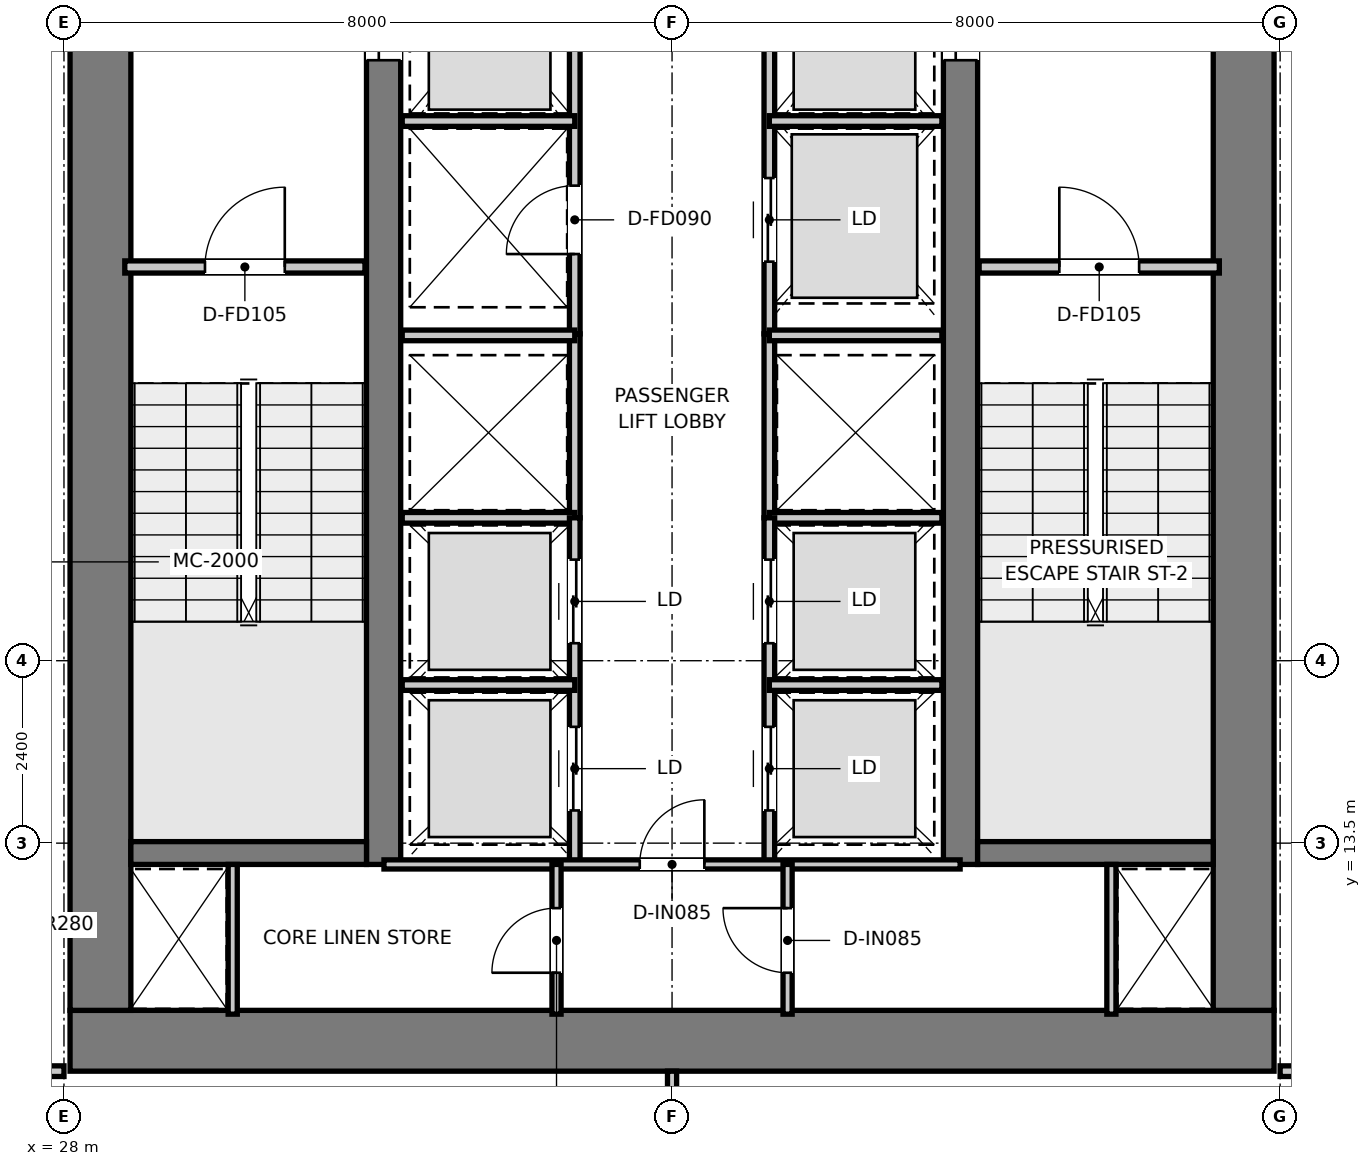
"""IFC4 building model, lengths in metres.
Left out: names, types, materials, properties, quantities, classifications, styles, units other than length and angle.
Written with IfcOpenShell. Run it as: python <this file> out.ifc"""

import sys

from ifc_helpers import new_model, si_unit, direction, frame, frame_2d, origin, place, context, subcontext, project, spatial, rectangle, extrude, element, fill, save


model = new_model("IFC4")
c1 = context("Model", 3, precision=1e-05, world=origin(), true_north=direction((0.0, 1.0)))
c2 = subcontext(c1, "Body", "Model", "MODEL_VIEW")
j1 = project(units=[si_unit("LENGTHUNIT", "METRE"), si_unit("PLANEANGLEUNIT", "RADIAN")], contexts=[c1])
p1 = place(None, origin())
s1 = spatial("IfcSite", under=j1, at=p1, CompositionType="ELEMENT")
p2 = place(p1, origin())
s2 = spatial("IfcBuilding", under=s1, at=p2, CompositionType="ELEMENT")
p3 = place(p2, frame((0.0, 0.0, 105.85)))
s3 = spatial("IfcBuildingStorey", under=s2, at=p3, CompositionType="ELEMENT", Elevation=105.85)
p4 = place(p3, frame((28.08, 10.9, 0.0), z_axis=(0.0, 0.0, 1.0), x_axis=(1.0, 0.0, 0.0)))
e1 = element("IfcWall", 1, at=p4, inside=s3, PredefinedType="SHEAR", context=c2, shape_type="SweptSolid", body=[
    extrude(rectangle(XDim=15.84, YDim=0.8, at=frame_2d((7.92, 0.0))), origin(), (0.0, 0.0, 1.0), 3.95),
])
for number, where, z_axis, x_axis in (
    (2, (28.48, 11.3, 0.0), (0.0, 0.0, 1.0), (0.0, 1.0, 0.0)),
    (3, (43.52, 11.3, 0.0), (0.0, 0.0, 1.0), (0.0, 1.0, 0.0)),
):
    element("IfcWall", number, at=place(p3, frame(where, z_axis=z_axis, x_axis=x_axis)), inside=s3, PredefinedType="SHEAR", context=c2, shape_type="SweptSolid", body=[
        extrude(rectangle(XDim=14.7, YDim=0.8, at=frame_2d((7.35, 0.0))), origin(), (0.0, 0.0, 1.0), 3.95),
    ])
p5 = place(p3, frame((32.205, 13.22, 0.0), z_axis=(0.0, 0.0, 1.0), x_axis=(0.0, 1.0, 0.0)))
e4 = element("IfcWall", 4, at=p5, inside=s3, PredefinedType="SHEAR", context=c2, shape_type="SweptSolid", body=[
    extrude(rectangle(XDim=12.78, YDim=0.45, at=frame_2d((6.39, 0.0))), origin(), (0.0, 0.0, 1.0), 3.95),
])
p6 = place(p5, frame((10.58, 0.0, 0.0)))
e5 = element("IfcOpeningElement", 5, at=p6, cuts=e4, PredefinedType="OPENING", context=c2, shape_type="SweptSolid", body=[
    extrude(rectangle(XDim=1.1, YDim=2.15, at=frame_2d((0.55, 1.075))), frame((0.0, 0.235, 0.0), z_axis=(0.0, -1.0, 0.0), x_axis=(1.0, 0.0, 0.0)), (0.0, 0.0, 1.0), 0.47),
])
p7 = place(p3, frame((39.795, 13.22, 0.0), z_axis=(0.0, 0.0, 1.0), x_axis=(0.0, 1.0, 0.0)))
e6 = element("IfcWall", 6, at=p7, inside=s3, PredefinedType="SHEAR", context=c2, shape_type="SweptSolid", body=[
    extrude(rectangle(XDim=12.78, YDim=0.45, at=frame_2d((6.39, 0.0))), origin(), (0.0, 0.0, 1.0), 3.95),
])
p8 = place(p7, frame((10.58, 0.0, 0.0)))
e7 = element("IfcOpeningElement", 7, at=p8, cuts=e6, PredefinedType="OPENING", context=c2, shape_type="SweptSolid", body=[
    extrude(rectangle(XDim=1.1, YDim=2.15, at=frame_2d((0.55, 1.075))), frame((0.0, 0.235, 0.0), z_axis=(0.0, -1.0, 0.0), x_axis=(1.0, 0.0, 0.0)), (0.0, 0.0, 1.0), 0.47),
])
for number, where, z_axis, x_axis in (
    (8, (28.88, 13.37, 0.0), (0.0, 0.0, 1.0), (1.0, 0.0, 0.0)),
    (9, (40.02, 13.37, 0.0), (0.0, 0.0, 1.0), (1.0, 0.0, 0.0)),
):
    element("IfcWall", number, at=place(p3, frame(where, z_axis=z_axis, x_axis=x_axis)), inside=s3, PredefinedType="SHEAR", context=c2, shape_type="SweptSolid", body=[
        extrude(rectangle(XDim=3.1, YDim=0.3, at=frame_2d((1.55, 0.0))), origin(), (0.0, 0.0, 1.0), 3.95),
    ])
p9 = place(p3, frame((28.8, 21.08, 0.0), z_axis=(0.0, 0.0, 1.0), x_axis=(1.0, 0.0, 0.0)))
e10 = element("IfcWall", 10, at=p9, inside=s3, PredefinedType="PARTITIONING", context=c2, shape_type="SweptSolid", body=[
    extrude(rectangle(XDim=3.16, YDim=0.16, at=frame_2d((1.58, 0.0))), origin(), (0.0, 0.0, 1.0), 3.67),
])
p10 = place(p9, frame((1.055, 0.0, 0.0)))
e11 = element("IfcOpeningElement", 11, at=p10, cuts=e10, PredefinedType="OPENING", context=c2, shape_type="SweptSolid", body=[
    extrude(rectangle(XDim=1.05, YDim=2.1, at=frame_2d((0.525, 1.05))), frame((0.0, 0.09, 0.0), z_axis=(0.0, -1.0, 0.0), x_axis=(1.0, 0.0, 0.0)), (0.0, 0.0, 1.0), 0.18),
])
p11 = place(p3, frame((40.04, 21.08, 0.0), z_axis=(0.0, 0.0, 1.0), x_axis=(1.0, 0.0, 0.0)))
e12 = element("IfcWall", 12, at=p11, inside=s3, PredefinedType="PARTITIONING", context=c2, shape_type="SweptSolid", body=[
    extrude(rectangle(XDim=3.16, YDim=0.16, at=frame_2d((1.58, 0.0))), origin(), (0.0, 0.0, 1.0), 3.67),
])
p12 = place(p11, frame((1.055, 0.0, 0.0)))
e13 = element("IfcOpeningElement", 13, at=p12, cuts=e12, PredefinedType="OPENING", context=c2, shape_type="SweptSolid", body=[
    extrude(rectangle(XDim=1.05, YDim=2.1, at=frame_2d((0.525, 1.05))), frame((0.0, 0.09, 0.0), z_axis=(0.0, -1.0, 0.0), x_axis=(1.0, 0.0, 0.0)), (0.0, 0.0, 1.0), 0.18),
])
p13 = place(p3, frame((34.72, 20.2, 0.0), z_axis=(0.0, 0.0, 1.0), x_axis=(0.0, 1.0, 0.0)))
e14 = element("IfcWall", 14, at=p13, inside=s3, PredefinedType="PARTITIONING", context=c2, shape_type="SweptSolid", body=[
    extrude(rectangle(XDim=5.78, YDim=0.14, at=frame_2d((2.89, 0.0))), origin(), (0.0, 0.0, 1.0), 2.67),
])
p14 = place(p13, frame((1.05, 0.0, 0.0)))
e15 = element("IfcOpeningElement", 15, at=p14, cuts=e14, PredefinedType="OPENING", context=c2, shape_type="SweptSolid", body=[
    extrude(rectangle(XDim=0.9, YDim=2.1, at=frame_2d((0.45, 1.05))), frame((0.0, 0.08, 0.0), z_axis=(0.0, -1.0, 0.0), x_axis=(1.0, 0.0, 0.0)), (0.0, 0.0, 1.0), 0.16),
])
p15 = place(p3, frame((37.28, 20.2, 0.0), z_axis=(0.0, 0.0, 1.0), x_axis=(0.0, 1.0, 0.0)))
e16 = element("IfcWall", 16, at=p15, inside=s3, PredefinedType="PARTITIONING", context=c2, shape_type="SweptSolid", body=[
    extrude(rectangle(XDim=5.78, YDim=0.14, at=frame_2d((2.89, 0.0))), origin(), (0.0, 0.0, 1.0), 2.67),
])
p16 = place(p15, frame((0.95, 0.0, 0.0)))
e17 = element("IfcOpeningElement", 17, at=p16, cuts=e16, PredefinedType="OPENING", context=c2, shape_type="SweptSolid", body=[
    extrude(rectangle(XDim=1.1, YDim=2.15, at=frame_2d((0.55, 1.075))), frame((0.0, 0.08, 0.0), z_axis=(0.0, -1.0, 0.0), x_axis=(1.0, 0.0, 0.0)), (0.0, 0.0, 1.0), 0.16),
])
for number, where, z_axis, x_axis in (
    (18, (32.45, 23.0, 0.0), (0.0, 0.0, 1.0), (1.0, 0.0, 0.0)),
    (19, (37.28, 23.0, 0.0), (0.0, 0.0, 1.0), (1.0, 0.0, 0.0)),
):
    element("IfcWall", number, at=place(p3, frame(where, z_axis=z_axis, x_axis=x_axis)), inside=s3, PredefinedType="PARTITIONING", context=c2, shape_type="SweptSolid", body=[
        extrude(rectangle(XDim=2.27, YDim=0.14, at=frame_2d((1.135, 0.0))), origin(), (0.0, 0.0, 1.0), 2.67),
    ])
for number, where, z_axis, x_axis in (
    (20, (34.72, 17.78, 0.0), (0.0, 0.0, 1.0), (0.0, 1.0, 0.0)),
    (21, (37.28, 17.78, 0.0), (0.0, 0.0, 1.0), (0.0, 1.0, 0.0)),
):
    element("IfcWall", number, at=place(p3, frame(where, z_axis=z_axis, x_axis=x_axis)), inside=s3, PredefinedType="PARTITIONING", context=c2, shape_type="SweptSolid", body=[
        extrude(rectangle(XDim=2.42, YDim=0.14, at=frame_2d((1.21, 0.0))), origin(), (0.0, 0.0, 1.0), 3.67),
    ])
for number, where, z_axis, x_axis in (
    (22, (32.45, 17.78, 0.0), (0.0, 0.0, 1.0), (1.0, 0.0, 0.0)),
    (23, (32.45, 20.18, 0.0), (0.0, 0.0, 1.0), (1.0, 0.0, 0.0)),
    (24, (37.28, 17.78, 0.0), (0.0, 0.0, 1.0), (1.0, 0.0, 0.0)),
    (25, (37.28, 20.18, 0.0), (0.0, 0.0, 1.0), (1.0, 0.0, 0.0)),
):
    element("IfcWall", number, at=place(p3, frame(where, z_axis=z_axis, x_axis=x_axis)), inside=s3, PredefinedType="PARTITIONING", context=c2, shape_type="SweptSolid", body=[
        extrude(rectangle(XDim=2.27, YDim=0.14, at=frame_2d((1.135, 0.0))), origin(), (0.0, 0.0, 1.0), 3.67),
    ])
p17 = place(p3, frame((34.72, 13.22, 0.0), z_axis=(0.0, 0.0, 1.0), x_axis=(0.0, 1.0, 0.0)))
e26 = element("IfcWall", 26, at=p17, inside=s3, PredefinedType="PARTITIONING", context=c2, shape_type="SweptSolid", body=[
    extrude(rectangle(XDim=4.56, YDim=0.14, at=frame_2d((2.28, 0.0))), origin(), (0.0, 0.0, 1.0), 3.67),
])
p18 = place(p17, frame((0.71, 0.0, 0.0)))
e27 = element("IfcOpeningElement", 27, at=p18, cuts=e26, PredefinedType="OPENING", context=c2, shape_type="SweptSolid", body=[
    extrude(rectangle(XDim=1.1, YDim=2.15, at=frame_2d((0.55, 1.075))), frame((0.0, 0.08, 0.0), z_axis=(0.0, -1.0, 0.0), x_axis=(1.0, 0.0, 0.0)), (0.0, 0.0, 1.0), 0.16),
])
p19 = place(p17, frame((2.91, 0.0, 0.0)))
e28 = element("IfcOpeningElement", 28, at=p19, cuts=e26, PredefinedType="OPENING", context=c2, shape_type="SweptSolid", body=[
    extrude(rectangle(XDim=1.1, YDim=2.15, at=frame_2d((0.55, 1.075))), frame((0.0, 0.08, 0.0), z_axis=(0.0, -1.0, 0.0), x_axis=(1.0, 0.0, 0.0)), (0.0, 0.0, 1.0), 0.16),
])
p20 = place(p3, frame((32.45, 15.58, 0.0), z_axis=(0.0, 0.0, 1.0), x_axis=(1.0, 0.0, 0.0)))
e29 = element("IfcWall", 29, at=p20, inside=s3, PredefinedType="PARTITIONING", context=c2, shape_type="SweptSolid", body=[
    extrude(rectangle(XDim=2.27, YDim=0.14, at=frame_2d((1.135, 0.0))), origin(), (0.0, 0.0, 1.0), 3.67),
])
p21 = place(p3, frame((37.28, 13.22, 0.0), z_axis=(0.0, 0.0, 1.0), x_axis=(0.0, 1.0, 0.0)))
e30 = element("IfcWall", 30, at=p21, inside=s3, PredefinedType="PARTITIONING", context=c2, shape_type="SweptSolid", body=[
    extrude(rectangle(XDim=4.56, YDim=0.14, at=frame_2d((2.28, 0.0))), origin(), (0.0, 0.0, 1.0), 3.67),
])
p22 = place(p21, frame((0.71, 0.0, 0.0)))
e31 = element("IfcOpeningElement", 31, at=p22, cuts=e30, PredefinedType="OPENING", context=c2, shape_type="SweptSolid", body=[
    extrude(rectangle(XDim=1.1, YDim=2.15, at=frame_2d((0.55, 1.075))), frame((0.0, 0.08, 0.0), z_axis=(0.0, -1.0, 0.0), x_axis=(1.0, 0.0, 0.0)), (0.0, 0.0, 1.0), 0.16),
])
p23 = place(p21, frame((2.91, 0.0, 0.0)))
e32 = element("IfcOpeningElement", 32, at=p23, cuts=e30, PredefinedType="OPENING", context=c2, shape_type="SweptSolid", body=[
    extrude(rectangle(XDim=1.1, YDim=2.15, at=frame_2d((0.55, 1.075))), frame((0.0, 0.08, 0.0), z_axis=(0.0, -1.0, 0.0), x_axis=(1.0, 0.0, 0.0)), (0.0, 0.0, 1.0), 0.16),
])
p24 = place(p3, frame((37.28, 15.58, 0.0), z_axis=(0.0, 0.0, 1.0), x_axis=(1.0, 0.0, 0.0)))
e33 = element("IfcWall", 33, at=p24, inside=s3, PredefinedType="PARTITIONING", context=c2, shape_type="SweptSolid", body=[
    extrude(rectangle(XDim=2.27, YDim=0.14, at=frame_2d((1.135, 0.0))), origin(), (0.0, 0.0, 1.0), 3.67),
])
for number, where, z_axis, x_axis in (
    (34, (30.22, 11.25, 0.0), (0.0, 0.0, 1.0), (0.0, 1.0, 0.0)),
    (35, (41.78, 11.25, 0.0), (0.0, 0.0, 1.0), (0.0, 1.0, 0.0)),
):
    element("IfcWall", number, at=place(p3, frame(where, z_axis=z_axis, x_axis=x_axis)), inside=s3, PredefinedType="PARTITIONING", context=c2, shape_type="SweptSolid", body=[
        extrude(rectangle(XDim=1.97, YDim=0.12, at=frame_2d((0.985, 0.0))), origin(), (0.0, 0.0, 1.0), 3.67),
    ])
p25 = place(p3, frame((32.21, 13.22, 0.0), z_axis=(0.0, 0.0, 1.0), x_axis=(1.0, 0.0, 0.0)))
e36 = element("IfcWall", 36, at=p25, inside=s3, PredefinedType="PARTITIONING", context=c2, shape_type="SweptSolid", body=[
    extrude(rectangle(XDim=7.58, YDim=0.12, at=frame_2d((3.79, 0.0))), origin(), (0.0, 0.0, 1.0), 3.67),
])
p26 = place(p25, frame((3.365, 0.0, 0.0)))
e37 = element("IfcOpeningElement", 37, at=p26, cuts=e36, PredefinedType="OPENING", context=c2, shape_type="SweptSolid", body=[
    extrude(rectangle(XDim=0.85, YDim=2.1, at=frame_2d((0.425, 1.05))), frame((0.0, 0.07, 0.0), z_axis=(0.0, -1.0, 0.0), x_axis=(1.0, 0.0, 0.0)), (0.0, 0.0, 1.0), 0.14),
])
p27 = place(p3, frame((34.48, 11.25, 0.0), z_axis=(0.0, 0.0, 1.0), x_axis=(0.0, 1.0, 0.0)))
e38 = element("IfcWall", 38, at=p27, inside=s3, PredefinedType="PARTITIONING", context=c2, shape_type="SweptSolid", body=[
    extrude(rectangle(XDim=1.97, YDim=0.12, at=frame_2d((0.985, 0.0))), origin(), (0.0, 0.0, 1.0), 3.67),
])
p28 = place(p27, frame((0.545, 0.0, 0.0)))
e39 = element("IfcOpeningElement", 39, at=p28, cuts=e38, PredefinedType="OPENING", context=c2, shape_type="SweptSolid", body=[
    extrude(rectangle(XDim=0.85, YDim=2.1, at=frame_2d((0.425, 1.05))), frame((0.0, 0.07, 0.0), z_axis=(0.0, -1.0, 0.0), x_axis=(1.0, 0.0, 0.0)), (0.0, 0.0, 1.0), 0.14),
])
p29 = place(p3, frame((37.52, 11.25, 0.0), z_axis=(0.0, 0.0, 1.0), x_axis=(0.0, 1.0, 0.0)))
e40 = element("IfcWall", 40, at=p29, inside=s3, PredefinedType="PARTITIONING", context=c2, shape_type="SweptSolid", body=[
    extrude(rectangle(XDim=1.97, YDim=0.12, at=frame_2d((0.985, 0.0))), origin(), (0.0, 0.0, 1.0), 3.67),
])
p30 = place(p29, frame((0.545, 0.0, 0.0)))
e41 = element("IfcOpeningElement", 41, at=p30, cuts=e40, PredefinedType="OPENING", context=c2, shape_type="SweptSolid", body=[
    extrude(rectangle(XDim=0.85, YDim=2.1, at=frame_2d((0.425, 1.05))), frame((0.0, 0.07, 0.0), z_axis=(0.0, -1.0, 0.0), x_axis=(1.0, 0.0, 0.0)), (0.0, 0.0, 1.0), 0.14),
])
p31 = place(p3, frame((26.32, 10.5, 0.0), z_axis=(0.0, 0.0, 1.0), x_axis=(1.0, 0.0, 0.0)))
e42 = element("IfcWall", 42, at=p31, inside=s3, PredefinedType="PARTITIONING", context=c2, shape_type="SweptSolid", body=[
    extrude(rectangle(XDim=1.68, YDim=0.14, at=frame_2d((0.84, 0.0))), origin(), (0.0, 0.0, 1.0), 3.67),
])
p32 = place(p31, frame((0.445, 0.0, 0.0)))
e43 = element("IfcOpeningElement", 43, at=p32, cuts=e42, PredefinedType="OPENING", context=c2, shape_type="SweptSolid", body=[
    extrude(rectangle(XDim=0.85, YDim=2.1, at=frame_2d((0.425, 1.05))), frame((0.0, 0.08, 0.0), z_axis=(0.0, -1.0, 0.0), x_axis=(1.0, 0.0, 0.0)), (0.0, 0.0, 1.0), 0.16),
])
p33 = place(p3, frame((44.0, 10.5, 0.0), z_axis=(0.0, 0.0, 1.0), x_axis=(1.0, 0.0, 0.0)))
e44 = element("IfcWall", 44, at=p33, inside=s3, PredefinedType="PARTITIONING", context=c2, shape_type="SweptSolid", body=[
    extrude(rectangle(XDim=1.68, YDim=0.14, at=frame_2d((0.84, 0.0))), origin(), (0.0, 0.0, 1.0), 3.67),
])
p34 = place(p33, frame((0.385, 0.0, 0.0)))
e45 = element("IfcOpeningElement", 45, at=p34, cuts=e44, PredefinedType="OPENING", context=c2, shape_type="SweptSolid", body=[
    extrude(rectangle(XDim=0.85, YDim=2.1, at=frame_2d((0.425, 1.05))), frame((0.0, 0.08, 0.0), z_axis=(0.0, -1.0, 0.0), x_axis=(1.0, 0.0, 0.0)), (0.0, 0.0, 1.0), 0.16),
])
p35 = place(p3, frame((36.0, 2.582, 0.0), z_axis=(0.0, 0.0, 1.0), x_axis=(0.0, 1.0, 0.0)))
e46 = element("IfcWall", 46, at=p35, inside=s3, PredefinedType="PARTITIONING", context=c2, shape_type="SweptSolid", body=[
    extrude(rectangle(XDim=7.918, YDim=0.12, at=frame_2d((3.959, 0.0))), origin(), (0.0, 0.0, 1.0), 3.67),
])
p36 = place(p10, origin())
e47 = element("IfcDoor", 47, at=p36, inside=s3, OperationType="SINGLE_SWING_RIGHT", PredefinedType="DOOR", context=c2, shape_type="SweptSolid", body=[
    extrude(rectangle(XDim=1.05, YDim=2.1, at=frame_2d((0.525, 1.05))), frame((0.0, 0.025, 0.0), z_axis=(0.0, -1.0, 0.0), x_axis=(1.0, 0.0, 0.0)), (0.0, 0.0, 1.0), 0.05),
])
fill(e11, e47)
p37 = place(p12, origin())
e48 = element("IfcDoor", 48, at=p37, inside=s3, OperationType="SINGLE_SWING_LEFT", PredefinedType="DOOR", context=c2, shape_type="SweptSolid", body=[
    extrude(rectangle(XDim=1.05, YDim=2.1, at=frame_2d((0.525, 1.05))), frame((0.0, 0.025, 0.0), z_axis=(0.0, -1.0, 0.0), x_axis=(1.0, 0.0, 0.0)), (0.0, 0.0, 1.0), 0.05),
])
fill(e13, e48)
p38 = place(p6, origin())
e49 = element("IfcDoor", 49, at=p38, inside=s3, OperationType="DOUBLE_DOOR_SLIDING", PredefinedType="DOOR", context=c2, shape_type="SweptSolid", body=[
    extrude(rectangle(XDim=1.1, YDim=2.15, at=frame_2d((0.55, 1.075))), frame((0.0, 0.025, 0.0), z_axis=(0.0, -1.0, 0.0), x_axis=(1.0, 0.0, 0.0)), (0.0, 0.0, 1.0), 0.05),
])
fill(e5, e49)
p39 = place(p8, origin())
e50 = element("IfcDoor", 50, at=p39, inside=s3, OperationType="DOUBLE_DOOR_SLIDING", PredefinedType="DOOR", context=c2, shape_type="SweptSolid", body=[
    extrude(rectangle(XDim=1.1, YDim=2.15, at=frame_2d((0.55, 1.075))), frame((0.0, 0.025, 0.0), z_axis=(0.0, -1.0, 0.0), x_axis=(1.0, 0.0, 0.0)), (0.0, 0.0, 1.0), 0.05),
])
fill(e7, e50)
p40 = place(p14, origin())
e51 = element("IfcDoor", 51, at=p40, inside=s3, OperationType="SINGLE_SWING_LEFT", PredefinedType="DOOR", context=c2, shape_type="SweptSolid", body=[
    extrude(rectangle(XDim=0.9, YDim=2.1, at=frame_2d((0.45, 1.05))), frame((0.0, 0.025, 0.0), z_axis=(0.0, -1.0, 0.0), x_axis=(1.0, 0.0, 0.0)), (0.0, 0.0, 1.0), 0.05),
])
fill(e15, e51)
p41 = place(p16, origin())
e52 = element("IfcDoor", 52, at=p41, inside=s3, OperationType="DOUBLE_DOOR_SLIDING", PredefinedType="DOOR", context=c2, shape_type="SweptSolid", body=[
    extrude(rectangle(XDim=1.1, YDim=2.15, at=frame_2d((0.55, 1.075))), frame((0.0, 0.025, 0.0), z_axis=(0.0, -1.0, 0.0), x_axis=(1.0, 0.0, 0.0)), (0.0, 0.0, 1.0), 0.05),
])
fill(e17, e52)
p42 = place(p18, origin())
e53 = element("IfcDoor", 53, at=p42, inside=s3, OperationType="DOUBLE_DOOR_SLIDING", PredefinedType="DOOR", context=c2, shape_type="SweptSolid", body=[
    extrude(rectangle(XDim=1.1, YDim=2.15, at=frame_2d((0.55, 1.075))), frame((0.0, 0.025, 0.0), z_axis=(0.0, -1.0, 0.0), x_axis=(1.0, 0.0, 0.0)), (0.0, 0.0, 1.0), 0.05),
])
fill(e27, e53)
p43 = place(p19, origin())
e54 = element("IfcDoor", 54, at=p43, inside=s3, OperationType="DOUBLE_DOOR_SLIDING", PredefinedType="DOOR", context=c2, shape_type="SweptSolid", body=[
    extrude(rectangle(XDim=1.1, YDim=2.15, at=frame_2d((0.55, 1.075))), frame((0.0, 0.025, 0.0), z_axis=(0.0, -1.0, 0.0), x_axis=(1.0, 0.0, 0.0)), (0.0, 0.0, 1.0), 0.05),
])
fill(e28, e54)
p44 = place(p22, origin())
e55 = element("IfcDoor", 55, at=p44, inside=s3, OperationType="DOUBLE_DOOR_SLIDING", PredefinedType="DOOR", context=c2, shape_type="SweptSolid", body=[
    extrude(rectangle(XDim=1.1, YDim=2.15, at=frame_2d((0.55, 1.075))), frame((0.0, 0.025, 0.0), z_axis=(0.0, -1.0, 0.0), x_axis=(1.0, 0.0, 0.0)), (0.0, 0.0, 1.0), 0.05),
])
fill(e31, e55)
p45 = place(p23, origin())
e56 = element("IfcDoor", 56, at=p45, inside=s3, OperationType="DOUBLE_DOOR_SLIDING", PredefinedType="DOOR", context=c2, shape_type="SweptSolid", body=[
    extrude(rectangle(XDim=1.1, YDim=2.15, at=frame_2d((0.55, 1.075))), frame((0.0, 0.025, 0.0), z_axis=(0.0, -1.0, 0.0), x_axis=(1.0, 0.0, 0.0)), (0.0, 0.0, 1.0), 0.05),
])
fill(e32, e56)
p46 = place(p26, origin())
e57 = element("IfcDoor", 57, at=p46, inside=s3, OperationType="SINGLE_SWING_RIGHT", PredefinedType="DOOR", context=c2, shape_type="SweptSolid", body=[
    extrude(rectangle(XDim=0.85, YDim=2.1, at=frame_2d((0.425, 1.05))), frame((0.0, 0.025, 0.0), z_axis=(0.0, -1.0, 0.0), x_axis=(1.0, 0.0, 0.0)), (0.0, 0.0, 1.0), 0.05),
])
fill(e37, e57)
p47 = place(p28, origin())
e58 = element("IfcDoor", 58, at=p47, inside=s3, OperationType="SINGLE_SWING_LEFT", PredefinedType="DOOR", context=c2, shape_type="SweptSolid", body=[
    extrude(rectangle(XDim=0.85, YDim=2.1, at=frame_2d((0.425, 1.05))), frame((0.0, 0.025, 0.0), z_axis=(0.0, -1.0, 0.0), x_axis=(1.0, 0.0, 0.0)), (0.0, 0.0, 1.0), 0.05),
])
fill(e39, e58)
p48 = place(p30, origin())
e59 = element("IfcDoor", 59, at=p48, inside=s3, OperationType="SINGLE_SWING_RIGHT", PredefinedType="DOOR", context=c2, shape_type="SweptSolid", body=[
    extrude(rectangle(XDim=0.85, YDim=2.1, at=frame_2d((0.425, 1.05))), frame((0.0, 0.025, 0.0), z_axis=(0.0, -1.0, 0.0), x_axis=(1.0, 0.0, 0.0)), (0.0, 0.0, 1.0), 0.05),
])
fill(e41, e59)
save(model, sys.argv[1])
